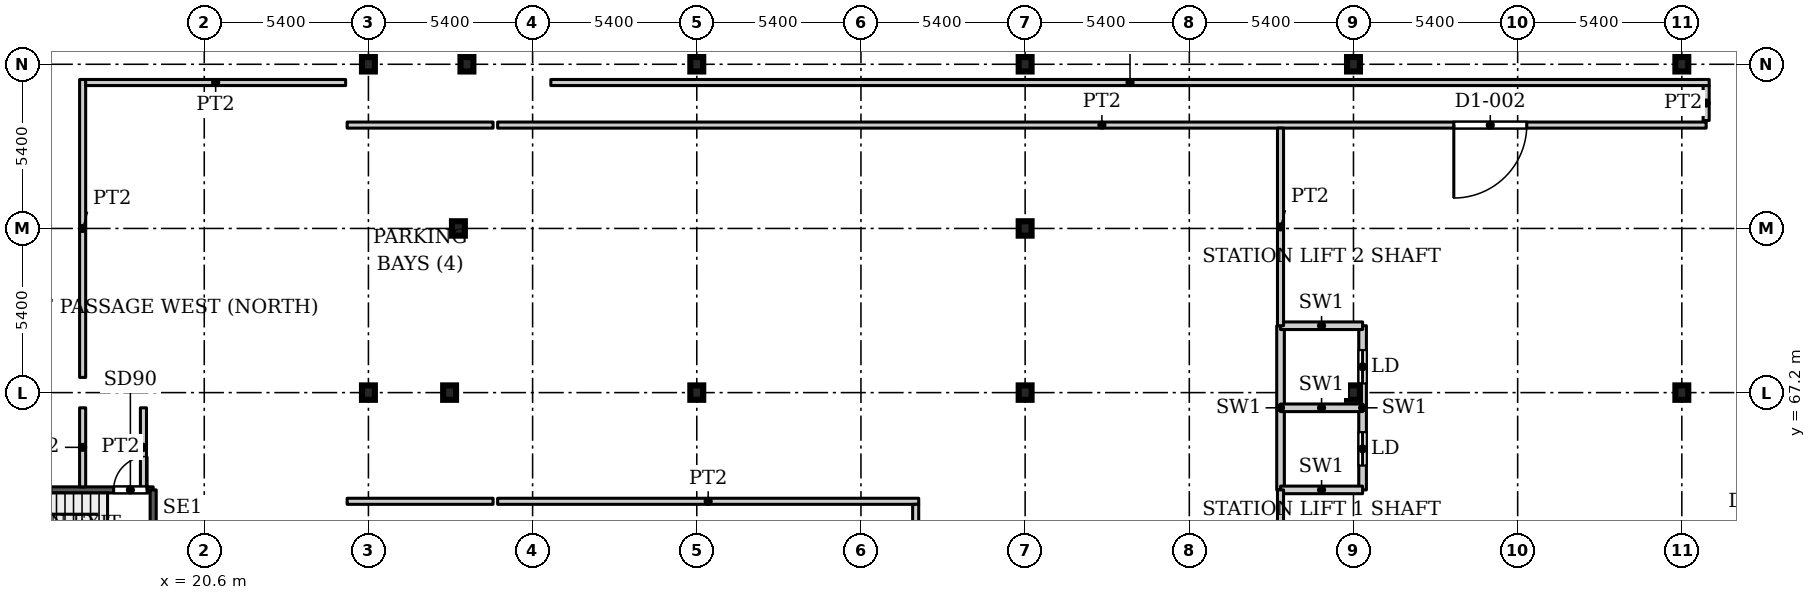
"""IFC4 building model, lengths in metres.
Left out: names, types, materials, properties, quantities, classifications, styles, units other than length and angle.
Written with IfcOpenShell. Run it as: python <this file> out.ifc"""

import sys

from ifc_helpers import new_model, si_unit, direction, frame, frame_2d, origin, origin_2d, place, context, subcontext, project, spatial, rectangle, i_section, extrude, source, transform, mapped, element, fill, save


model = new_model("IFC4")
c1 = context("Model", 3, precision=1e-05, world=origin(), true_north=direction((0.0, 1.0)))
c2 = subcontext(c1, "Body", "Model", "MODEL_VIEW")
j1 = project(units=[si_unit("LENGTHUNIT", "METRE"), si_unit("PLANEANGLEUNIT", "RADIAN")], contexts=[c1])
p1 = place(None, origin())
s1 = spatial("IfcSite", under=j1, at=p1, CompositionType="ELEMENT")
p2 = place(p1, origin())
s2 = spatial("IfcBuilding", under=s1, at=p2, CompositionType="ELEMENT")
p3 = place(p2, frame((0.0, 0.0, -5.0)))
s3 = spatial("IfcBuildingStorey", under=s2, at=p3, CompositionType="ELEMENT", Elevation=-5.0)
for number, where, z_axis, x_axis in (
    (1, (26.0, 67.2, 0.0), (0.0, 0.0, 1.0), (1.0, 0.0, 0.0)),
    (2, (36.8, 67.2, 0.0), (0.0, 0.0, 1.0), (1.0, 0.0, 0.0)),
    (3, (47.6, 67.2, 0.0), (0.0, 0.0, 1.0), (1.0, 0.0, 0.0)),
    (4, (58.4, 67.2, 0.0), (0.0, 0.0, 1.0), (1.0, 0.0, 0.0)),
    (5, (69.2, 67.2, 0.0), (0.0, 0.0, 1.0), (1.0, 0.0, 0.0)),
    (6, (26.0, 78.0, 0.0), (0.0, 0.0, 1.0), (1.0, 0.0, 0.0)),
    (7, (36.8, 78.0, 0.0), (0.0, 0.0, 1.0), (1.0, 0.0, 0.0)),
    (8, (47.6, 78.0, 0.0), (0.0, 0.0, 1.0), (1.0, 0.0, 0.0)),
    (9, (58.4, 78.0, 0.0), (0.0, 0.0, 1.0), (1.0, 0.0, 0.0)),
    (10, (69.2, 78.0, 0.0), (0.0, 0.0, 1.0), (1.0, 0.0, 0.0)),
    (11, (28.67, 67.2, 0.0), (0.0, 0.0, 1.0), (1.0, 0.0, 0.0)),
    (12, (28.96, 72.6, 0.0), (0.0, 0.0, 1.0), (1.0, 0.0, 0.0)),
    (13, (47.6, 72.6, 0.0), (0.0, 0.0, 1.0), (1.0, 0.0, 0.0)),
    (14, (29.24, 78.0, 0.0), (0.0, 0.0, 1.0), (1.0, 0.0, 0.0)),
):
    element("IfcColumn", number, at=place(p3, frame(where, z_axis=z_axis, x_axis=x_axis)), inside=s3, PredefinedType="COLUMN", context=c2, shape_type="SweptSolid", body=[
        extrude(i_section(OverallWidth=0.424, OverallDepth=0.474, WebThickness=0.048, FlangeThickness=0.077, FilletRadius=0.014, at=origin_2d()), origin(), (0.0, 0.0, 1.0), 5.0),
    ])
p4 = place(p3, frame((56.0, 64.0, 0.0), z_axis=(0.0, 0.0, 1.0), x_axis=(0.0, 1.0, 0.0)))
e15 = element("IfcWall", 15, at=p4, inside=s3, PredefinedType="PARTITIONING", context=c2, shape_type="SweptSolid", body=[
    extrude(rectangle(XDim=5.4, YDim=0.25, at=frame_2d((2.7, 0.0))), origin(), (0.0, 0.0, 1.0), 5.0),
])
p5 = place(p3, frame((58.7, 64.0, 0.0), z_axis=(0.0, 0.0, 1.0), x_axis=(0.0, 1.0, 0.0)))
e16 = element("IfcWall", 16, at=p5, inside=s3, PredefinedType="PARTITIONING", context=c2, shape_type="SweptSolid", body=[
    extrude(rectangle(XDim=5.4, YDim=0.25, at=frame_2d((2.7, 0.0))), origin(), (0.0, 0.0, 1.0), 5.0),
])
p6 = place(p5, frame((0.8, 0.0, 0.0)))
e17 = element("IfcOpeningElement", 17, at=p6, cuts=e16, PredefinedType="OPENING", context=c2, shape_type="SweptSolid", body=[
    extrude(rectangle(XDim=1.1, YDim=2.2, at=frame_2d((0.55, 1.1))), frame((0.0, 0.135, 0.0), z_axis=(0.0, -1.0, 0.0), x_axis=(1.0, 0.0, 0.0)), (0.0, 0.0, 1.0), 0.27),
])
p7 = place(p5, frame((3.5, 0.0, 0.0)))
e18 = element("IfcOpeningElement", 18, at=p7, cuts=e16, PredefinedType="OPENING", context=c2, shape_type="SweptSolid", body=[
    extrude(rectangle(XDim=1.1, YDim=2.2, at=frame_2d((0.55, 1.1))), frame((0.0, 0.135, 0.0), z_axis=(0.0, -1.0, 0.0), x_axis=(1.0, 0.0, 0.0)), (0.0, 0.0, 1.0), 0.27),
])
for number, where, z_axis, x_axis in (
    (19, (56.0, 64.0, 0.0), (0.0, 0.0, 1.0), (1.0, 0.0, 0.0)),
    (20, (56.0, 66.7, 0.0), (0.0, 0.0, 1.0), (1.0, 0.0, 0.0)),
    (21, (56.0, 69.4, 0.0), (0.0, 0.0, 1.0), (1.0, 0.0, 0.0)),
):
    element("IfcWall", number, at=place(p3, frame(where, z_axis=z_axis, x_axis=x_axis)), inside=s3, PredefinedType="PARTITIONING", context=c2, shape_type="SweptSolid", body=[
        extrude(rectangle(XDim=2.7, YDim=0.25, at=frame_2d((1.35, 0.0))), origin(), (0.0, 0.0, 1.0), 5.0),
    ])
p8 = place(p3, frame((12.0, 64.0, 0.0), z_axis=(0.0, 0.0, 1.0), x_axis=(1.0, 0.0, 0.0)))
e22 = element("IfcWall", 22, at=p8, inside=s3, PredefinedType="SHEAR", context=c2, shape_type="SweptSolid", body=[
    extrude(rectangle(XDim=6.92, YDim=0.2, at=frame_2d((3.46, 0.0))), origin(), (0.0, 0.0, 1.0), 5.0),
])
p9 = place(p8, frame((5.62, 0.0, 0.0)))
e23 = element("IfcOpeningElement", 23, at=p9, cuts=e22, PredefinedType="OPENING", context=c2, shape_type="SweptSolid", body=[
    extrude(rectangle(XDim=1.1, YDim=2.2, at=frame_2d((0.55, 1.1))), frame((0.0, 0.11, 0.0), z_axis=(0.0, -1.0, 0.0), x_axis=(1.0, 0.0, 0.0)), (0.0, 0.0, 1.0), 0.22),
])
p10 = place(p3, frame((18.92, 60.85, 0.0), z_axis=(0.0, 0.0, 1.0), x_axis=(0.0, 1.0, 0.0)))
e24 = element("IfcWall", 24, at=p10, inside=s3, PredefinedType="SHEAR", context=c2, shape_type="SweptSolid", body=[
    extrude(rectangle(XDim=3.15, YDim=0.2, at=frame_2d((1.575, 0.0))), origin(), (0.0, 0.0, 1.0), 5.0),
])
p11 = place(p3, frame((16.6, 64.1, 0.0), z_axis=(0.0, 0.0, 1.0), x_axis=(0.0, 1.0, 0.0)))
e25 = element("IfcWall", 25, at=p11, inside=s3, PredefinedType="PARTITIONING", context=c2, shape_type="SweptSolid", body=[
    extrude(rectangle(XDim=2.6, YDim=0.2, at=frame_2d((1.3, 0.0))), origin(), (0.0, 0.0, 1.0), 4.58),
])
p12 = place(p3, frame((16.6, 67.7, 0.0), z_axis=(0.0, 0.0, 1.0), x_axis=(0.0, 1.0, 0.0)))
e26 = element("IfcWall", 26, at=p12, inside=s3, PredefinedType="PARTITIONING", context=c2, shape_type="SweptSolid", body=[
    extrude(rectangle(XDim=9.8, YDim=0.2, at=frame_2d((4.9, 0.0))), origin(), (0.0, 0.0, 1.0), 4.58),
])
p13 = place(p3, frame((16.7, 77.4, 0.0), z_axis=(0.0, 0.0, 1.0), x_axis=(1.0, 0.0, 0.0)))
e27 = element("IfcWall", 27, at=p13, inside=s3, PredefinedType="PARTITIONING", context=c2, shape_type="SweptSolid", body=[
    extrude(rectangle(XDim=8.55, YDim=0.2, at=frame_2d((4.275, 0.0))), origin(), (0.0, 0.0, 1.0), 4.58),
])
p14 = place(p3, frame((18.6, 64.1, 0.0), z_axis=(0.0, 0.0, 1.0), x_axis=(0.0, 1.0, 0.0)))
e28 = element("IfcWall", 28, at=p14, inside=s3, PredefinedType="PARTITIONING", context=c2, shape_type="SweptSolid", body=[
    extrude(rectangle(XDim=2.6, YDim=0.2, at=frame_2d((1.3, 0.0))), origin(), (0.0, 0.0, 1.0), 4.58),
])
for number, where, z_axis, x_axis in (
    (29, (25.3, 63.625, 0.0), (0.0, 0.0, 1.0), (1.0, 0.0, 0.0)),
    (30, (25.3, 76.0, 0.0), (0.0, 0.0, 1.0), (1.0, 0.0, 0.0)),
):
    element("IfcWall", number, at=place(p3, frame(where, z_axis=z_axis, x_axis=x_axis)), inside=s3, PredefinedType="PARTITIONING", context=c2, shape_type="SweptSolid", body=[
        extrude(rectangle(XDim=4.8, YDim=0.2, at=frame_2d((2.4, 0.0))), origin(), (0.0, 0.0, 1.0), 4.58),
    ])
p15 = place(p3, frame((30.25, 63.625, 0.0), z_axis=(0.0, 0.0, 1.0), x_axis=(1.0, 0.0, 0.0)))
e31 = element("IfcWall", 31, at=p15, inside=s3, PredefinedType="PARTITIONING", context=c2, shape_type="SweptSolid", body=[
    extrude(rectangle(XDim=13.85, YDim=0.2, at=frame_2d((6.925, 0.0))), origin(), (0.0, 0.0, 1.0), 4.58),
])
p16 = place(p3, frame((30.25, 76.0, 0.0), z_axis=(0.0, 0.0, 1.0), x_axis=(1.0, 0.0, 0.0)))
e32 = element("IfcWall", 32, at=p16, inside=s3, PredefinedType="PARTITIONING", context=c2, shape_type="SweptSolid", body=[
    extrude(rectangle(XDim=39.75, YDim=0.2, at=frame_2d((19.875, 0.0))), origin(), (0.0, 0.0, 1.0), 4.58),
])
p17 = place(p16, frame((31.45, 0.0, 0.0)))
e33 = element("IfcOpeningElement", 33, at=p17, cuts=e32, PredefinedType="OPENING", context=c2, shape_type="SweptSolid", body=[
    extrude(rectangle(XDim=2.4, YDim=2.1, at=frame_2d((1.2, 1.05))), frame((0.0, 0.11, 0.0), z_axis=(0.0, -1.0, 0.0), x_axis=(1.0, 0.0, 0.0)), (0.0, 0.0, 1.0), 0.22),
])
p18 = place(p3, frame((32.0, 77.4, 0.0), z_axis=(0.0, 0.0, 1.0), x_axis=(1.0, 0.0, 0.0)))
e34 = element("IfcWall", 34, at=p18, inside=s3, PredefinedType="PARTITIONING", context=c2, shape_type="SweptSolid", body=[
    extrude(rectangle(XDim=38.1, YDim=0.2, at=frame_2d((19.05, 0.0))), origin(), (0.0, 0.0, 1.0), 4.58),
])
p19 = place(p3, frame((44.0, 61.325, 0.0), z_axis=(0.0, 0.0, 1.0), x_axis=(0.0, 1.0, 0.0)))
e35 = element("IfcWall", 35, at=p19, inside=s3, PredefinedType="PARTITIONING", context=c2, shape_type="SweptSolid", body=[
    extrude(rectangle(XDim=2.2, YDim=0.2, at=frame_2d((1.1, 0.0))), origin(), (0.0, 0.0, 1.0), 4.58),
])
p20 = place(p3, frame((56.0, 44.0, 0.0), z_axis=(0.0, 0.0, 1.0), x_axis=(0.0, 1.0, 0.0)))
e36 = element("IfcWall", 36, at=p20, inside=s3, PredefinedType="PARTITIONING", context=c2, shape_type="SweptSolid", body=[
    extrude(rectangle(XDim=20.0, YDim=0.2, at=frame_2d((10.0, 0.0))), origin(), (0.0, 0.0, 1.0), 4.58),
])
p21 = place(p20, frame((9.4, 0.0, 0.0)))
e37 = element("IfcOpeningElement", 37, at=p21, cuts=e36, PredefinedType="OPENING", context=c2, shape_type="SweptSolid", body=[
    extrude(rectangle(XDim=1.2, YDim=2.1, at=frame_2d((0.6, 1.05))), frame((0.0, 0.11, 0.0), z_axis=(0.0, -1.0, 0.0), x_axis=(1.0, 0.0, 0.0)), (0.0, 0.0, 1.0), 0.22),
])
p22 = place(p3, frame((56.0, 69.4, 0.0), z_axis=(0.0, 0.0, 1.0), x_axis=(0.0, 1.0, 0.0)))
e38 = element("IfcWall", 38, at=p22, inside=s3, PredefinedType="PARTITIONING", context=c2, shape_type="SweptSolid", body=[
    extrude(rectangle(XDim=6.5, YDim=0.2, at=frame_2d((3.25, 0.0))), origin(), (0.0, 0.0, 1.0), 4.58),
])
p23 = place(p3, frame((70.0, 76.15, 0.0), z_axis=(0.0, 0.0, 1.0), x_axis=(0.0, 1.0, 0.0)))
e39 = element("IfcWall", 39, at=p23, inside=s3, PredefinedType="PARTITIONING", context=c2, shape_type="SweptSolid", body=[
    extrude(rectangle(XDim=1.15, YDim=0.2, at=frame_2d((0.575, 0.0))), origin(), (0.0, 0.0, 1.0), 4.58),
])
m1 = source(origin(), c2, "Body", "SweptSolid", [
    extrude(rectangle(XDim=1.1, YDim=2.2, at=frame_2d((0.55, 1.1))), frame((0.0, 0.025, 0.0), z_axis=(0.0, -1.0, 0.0), x_axis=(1.0, 0.0, 0.0)), (0.0, 0.0, 1.0), 0.05),
])
p24 = place(p6, origin())
e40 = element("IfcDoor", 40, at=p24, inside=s3, OperationType="SLIDING_TO_LEFT", PredefinedType="DOOR", context=c2, shape_type="MappedRepresentation", body=[
    mapped(m1, transform((0.0, 0.0, 0.0), x_axis=(1.0, 0.0, 0.0), y_axis=(0.0, 1.0, 0.0), z_axis=(0.0, 0.0, 1.0), scale=1.0)),
])
fill(e17, e40)
p25 = place(p7, origin())
e41 = element("IfcDoor", 41, at=p25, inside=s3, OperationType="SLIDING_TO_LEFT", PredefinedType="DOOR", context=c2, shape_type="MappedRepresentation", body=[
    mapped(m1, transform((0.0, 0.0, 0.0), x_axis=(1.0, 0.0, 0.0), y_axis=(0.0, 1.0, 0.0), z_axis=(0.0, 0.0, 1.0), scale=1.0)),
])
fill(e18, e41)
m2 = source(origin(), c2, "Body", "SweptSolid", [
    extrude(rectangle(XDim=1.1, YDim=2.2, at=frame_2d((0.55, 1.1))), frame((0.0, 0.025, 0.0), z_axis=(0.0, -1.0, 0.0), x_axis=(1.0, 0.0, 0.0)), (0.0, 0.0, 1.0), 0.05),
])
p26 = place(p9, origin())
e42 = element("IfcDoor", 42, at=p26, inside=s3, OperationType="SINGLE_SWING_LEFT", PredefinedType="DOOR", context=c2, shape_type="MappedRepresentation", body=[
    mapped(m2, transform((0.0, 0.0, 0.0), x_axis=(1.0, 0.0, 0.0), y_axis=(0.0, 1.0, 0.0), z_axis=(0.0, 0.0, 1.0), scale=1.0)),
])
fill(e23, e42)
m3 = source(origin(), c2, "Body", "SweptSolid", [
    extrude(rectangle(XDim=2.4, YDim=2.1, at=frame_2d((1.2, 1.05))), frame((0.0, 0.025, 0.0), z_axis=(0.0, -1.0, 0.0), x_axis=(1.0, 0.0, 0.0)), (0.0, 0.0, 1.0), 0.05),
])
p27 = place(p17, origin())
e43 = element("IfcDoor", 43, at=p27, inside=s3, OperationType="DOUBLE_DOOR_SINGLE_SWING", PredefinedType="DOOR", context=c2, shape_type="MappedRepresentation", body=[
    mapped(m3, transform((0.0, 0.0, 0.0), x_axis=(1.0, 0.0, 0.0), y_axis=(0.0, 1.0, 0.0), z_axis=(0.0, 0.0, 1.0), scale=1.0)),
])
fill(e33, e43)
save(model, sys.argv[1])
